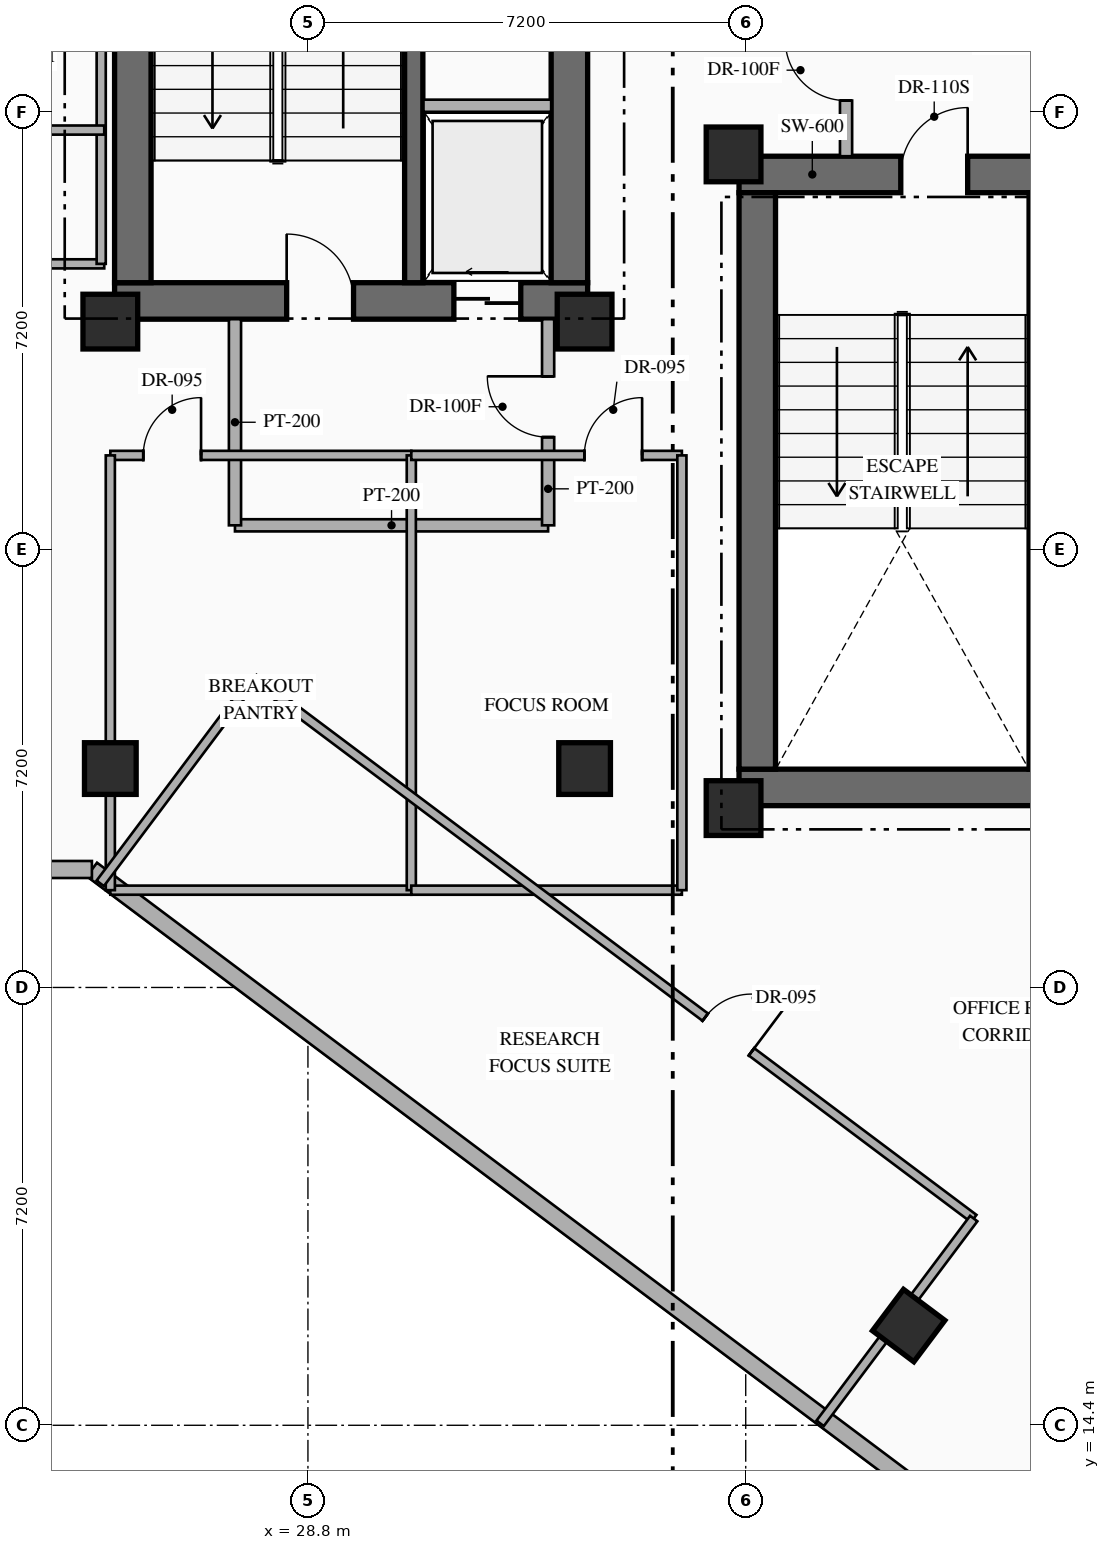
"""IFC4 building model, lengths in metres.
Left out: names, types, materials, properties, quantities, classifications, styles, units other than length and angle.
Written with IfcOpenShell. Run it as: python <this file> out.ifc"""

import sys

from ifc_helpers import new_model, si_unit, direction, frame, frame_2d, origin, origin_2d, place, context, subcontext, project, spatial, rectangle, hollow_rectangle, extrude, element, fill, save


model = new_model("IFC4")
c1 = context("Model", 3, precision=1e-05, world=origin(), true_north=direction((0.0, 1.0)))
c2 = subcontext(c1, "Body", "Model", "MODEL_VIEW")
j1 = project(units=[si_unit("LENGTHUNIT", "METRE"), si_unit("PLANEANGLEUNIT", "RADIAN")], contexts=[c1])
p1 = place(None, origin())
s1 = spatial("IfcSite", under=j1, at=p1, CompositionType="ELEMENT")
p2 = place(p1, origin())
s2 = spatial("IfcBuilding", under=s1, at=p2, CompositionType="ELEMENT")
p3 = place(p2, frame((0.0, 0.0, 145.65)))
s3 = spatial("IfcBuildingStorey", under=s2, at=p3, CompositionType="ELEMENT", Elevation=145.65)
p4 = place(p3, frame((25.62, 32.89, 0.0), z_axis=(0.0, 0.0, 1.0), x_axis=(1.0, 0.0, 0.0)))
e1 = element("IfcWall", 1, at=p4, inside=s3, PredefinedType="SHEAR", context=c2, shape_type="SweptSolid", body=[
    extrude(rectangle(XDim=7.78, YDim=0.6, at=frame_2d((3.89, 0.0))), origin(), (0.0, 0.0, 1.0), 3.6),
])
p5 = place(p4, frame((2.83, 0.0, 0.0)))
e2 = element("IfcOpeningElement", 2, at=p5, cuts=e1, PredefinedType="OPENING", context=c2, shape_type="SweptSolid", body=[
    extrude(rectangle(XDim=1.1, YDim=2.2, at=frame_2d((0.55, 1.1))), frame((0.0, 0.31, 0.0), z_axis=(0.0, -1.0, 0.0), x_axis=(1.0, 0.0, 0.0)), (0.0, 0.0, 1.0), 0.62),
])
p6 = place(p4, frame((5.58, 0.0, 0.0)))
e3 = element("IfcOpeningElement", 3, at=p6, cuts=e1, PredefinedType="OPENING", context=c2, shape_type="SweptSolid", body=[
    extrude(rectangle(XDim=1.1, YDim=2.15, at=frame_2d((0.55, 1.075))), frame((0.0, 0.31, 0.0), z_axis=(0.0, -1.0, 0.0), x_axis=(1.0, 0.0, 0.0)), (0.0, 0.0, 1.0), 0.62),
])
p7 = place(p3, frame((25.92, 33.19, 0.0), z_axis=(0.0, 0.0, 1.0), x_axis=(0.0, 1.0, 0.0)))
e4 = element("IfcWall", 4, at=p7, inside=s3, PredefinedType="SHEAR", context=c2, shape_type="SweptSolid", body=[
    extrude(rectangle(XDim=9.48, YDim=0.6, at=frame_2d((4.74, 0.0))), origin(), (0.0, 0.0, 1.0), 3.6),
])
p8 = place(p3, frame((33.1, 33.19, 0.0), z_axis=(0.0, 0.0, 1.0), x_axis=(0.0, 1.0, 0.0)))
e5 = element("IfcWall", 5, at=p8, inside=s3, PredefinedType="SHEAR", context=c2, shape_type="SweptSolid", body=[
    extrude(rectangle(XDim=9.48, YDim=0.6, at=frame_2d((4.74, 0.0))), origin(), (0.0, 0.0, 1.0), 3.6),
])
p9 = place(p8, frame((4.16, 0.0, 0.0)))
e6 = element("IfcOpeningElement", 6, at=p9, cuts=e5, PredefinedType="OPENING", context=c2, shape_type="SweptSolid", body=[
    extrude(rectangle(XDim=0.85, YDim=2.08, at=frame_2d((0.425, 1.04))), frame((0.0, 0.31, 0.0), z_axis=(0.0, -1.0, 0.0), x_axis=(1.0, 0.0, 0.0)), (0.0, 0.0, 1.0), 0.62),
])
p10 = place(p8, frame((7.36, 0.0, 0.0)))
e7 = element("IfcOpeningElement", 7, at=p10, cuts=e5, PredefinedType="OPENING", context=c2, shape_type="SweptSolid", body=[
    extrude(rectangle(XDim=0.85, YDim=2.08, at=frame_2d((0.425, 1.04))), frame((0.0, 0.31, 0.0), z_axis=(0.0, -1.0, 0.0), x_axis=(1.0, 0.0, 0.0)), (0.0, 0.0, 1.0), 0.62),
])
p11 = place(p3, frame((30.54, 33.19, 0.0), z_axis=(0.0, 0.0, 1.0), x_axis=(0.0, 1.0, 0.0)))
e8 = element("IfcWall", 8, at=p11, inside=s3, PredefinedType="SHEAR", context=c2, shape_type="SweptSolid", body=[
    extrude(rectangle(XDim=9.48, YDim=0.3, at=frame_2d((4.74, 0.0))), origin(), (0.0, 0.0, 1.0), 3.6),
])
p12 = place(p3, frame((35.89, 24.89, 0.0), z_axis=(0.0, 0.0, 1.0), x_axis=(1.0, 0.0, 0.0)))
e9 = element("IfcWall", 9, at=p12, inside=s3, PredefinedType="SHEAR", context=c2, shape_type="SweptSolid", body=[
    extrude(rectangle(XDim=7.76, YDim=0.6, at=frame_2d((3.88, 0.0))), origin(), (0.0, 0.0, 1.0), 3.6),
])
p13 = place(p3, frame((35.89, 34.97, 0.0), z_axis=(0.0, 0.0, 1.0), x_axis=(1.0, 0.0, 0.0)))
e10 = element("IfcWall", 10, at=p13, inside=s3, PredefinedType="SHEAR", context=c2, shape_type="SweptSolid", body=[
    extrude(rectangle(XDim=7.76, YDim=0.6, at=frame_2d((3.88, 0.0))), origin(), (0.0, 0.0, 1.0), 3.6),
])
p14 = place(p13, frame((2.66, 0.0, 0.0)))
e11 = element("IfcOpeningElement", 11, at=p14, cuts=e10, PredefinedType="OPENING", context=c2, shape_type="SweptSolid", body=[
    extrude(rectangle(XDim=1.1, YDim=2.2, at=frame_2d((0.55, 1.1))), frame((0.0, 0.31, 0.0), z_axis=(0.0, -1.0, 0.0), x_axis=(1.0, 0.0, 0.0)), (0.0, 0.0, 1.0), 0.62),
])
p15 = place(p13, frame((5.56, 0.0, 0.0)))
e12 = element("IfcOpeningElement", 12, at=p15, cuts=e10, PredefinedType="OPENING", context=c2, shape_type="SweptSolid", body=[
    extrude(rectangle(XDim=1.12, YDim=2.15, at=frame_2d((0.56, 1.075))), frame((0.0, 0.31, 0.0), z_axis=(0.0, -1.0, 0.0), x_axis=(1.0, 0.0, 0.0)), (0.0, 0.0, 1.0), 0.62),
])
p16 = place(p3, frame((36.19, 25.19, 0.0), z_axis=(0.0, 0.0, 1.0), x_axis=(0.0, 1.0, 0.0)))
e13 = element("IfcWall", 13, at=p16, inside=s3, PredefinedType="SHEAR", context=c2, shape_type="SweptSolid", body=[
    extrude(rectangle(XDim=9.48, YDim=0.6, at=frame_2d((4.74, 0.0))), origin(), (0.0, 0.0, 1.0), 3.6),
])
p17 = place(p3, frame((40.81, 25.19, 0.0), z_axis=(0.0, 0.0, 1.0), x_axis=(0.0, 1.0, 0.0)))
e14 = element("IfcWall", 14, at=p17, inside=s3, PredefinedType="SHEAR", context=c2, shape_type="SweptSolid", body=[
    extrude(rectangle(XDim=9.48, YDim=0.3, at=frame_2d((4.74, 0.0))), origin(), (0.0, 0.0, 1.0), 3.6),
])
for number, where, z_axis, x_axis in (
    (15, (25.55, 32.55, 0.0), (0.0, 0.0, 1.0), (1.0, 0.0, 0.0)),
    (16, (33.35, 32.55, 0.0), (0.0, 0.0, 1.0), (1.0, 0.0, 0.0)),
    (17, (35.8, 24.55, 0.0), (0.0, 0.0, 1.0), (1.0, 0.0, 0.0)),
    (18, (35.8, 35.3, 0.0), (0.0, 0.0, 1.0), (1.0, 0.0, 0.0)),
):
    element("IfcColumn", number, at=place(p3, frame(where, z_axis=z_axis, x_axis=x_axis)), inside=s3, PredefinedType="COLUMN", context=c2, shape_type="SweptSolid", body=[
        extrude(rectangle(XDim=0.9, YDim=0.9, at=origin_2d()), origin(), (0.0, 0.0, 1.0), 3.6),
    ])
for number, where, z_axis, x_axis in (
    (19, (25.55, 25.2, 0.0), (0.0, 0.0, 1.0), (1.0, 0.0, 0.0)),
    (20, (33.35, 25.2, 0.0), (0.0, 0.0, 1.0), (1.0, 0.0, 0.0)),
    (21, (38.68, 16.04, 0.0), (0.0, 0.0, 1.0), (0.8, -0.6, 0.0)),
):
    element("IfcColumn", number, at=place(p3, frame(where, z_axis=z_axis, x_axis=x_axis)), inside=s3, PredefinedType="COLUMN", context=c2, shape_type="SweptSolid", body=[
        extrude(hollow_rectangle(XDim=0.85, YDim=0.85, WallThickness=0.032, at=origin_2d()), origin(), (0.0, 0.0, 1.0), 3.6),
    ])
p18 = place(p3, frame((44.918, 8.787, 0.0), z_axis=(0.0, 0.0, 1.0), x_axis=(-0.800004765927, 0.599993645378, 0.0)))
e22 = element("IfcWall", 22, at=p18, inside=s3, PredefinedType="STANDARD", context=c2, shape_type="SweptSolid", body=[
    extrude(rectangle(XDim=24.588, YDim=0.28, at=frame_2d((12.294, 0.0))), origin(), (0.0, 0.0, 1.0), 3.35),
])
p19 = place(p3, frame((25.247, 23.54, 0.0), z_axis=(0.0, 0.0, 1.0), x_axis=(-1.0, 0.0, 0.0)))
e23 = element("IfcWall", 23, at=p19, inside=s3, PredefinedType="STANDARD", context=c2, shape_type="SweptSolid", body=[
    extrude(rectangle(XDim=6.747, YDim=0.28, at=frame_2d((3.374, 0.0))), origin(), (0.0, 0.0, 1.0), 3.35),
])
p20 = place(p3, frame((30.7, 36.1, 0.0), z_axis=(0.0, 0.0, 1.0), x_axis=(1.0, 0.0, 0.0)))
e24 = element("IfcWall", 24, at=p20, inside=s3, PredefinedType="STANDARD", context=c2, shape_type="SweptSolid", body=[
    extrude(rectangle(XDim=2.1, YDim=0.2, at=frame_2d((1.05, 0.0))), origin(), (0.0, 0.0, 1.0), 3.35),
])
p21 = place(p3, frame((27.6, 29.2, 0.0), z_axis=(0.0, 0.0, 1.0), x_axis=(1.0, 0.0, 0.0)))
e25 = element("IfcWall", 25, at=p21, inside=s3, PredefinedType="STANDARD", context=c2, shape_type="SweptSolid", body=[
    extrude(rectangle(XDim=5.15, YDim=0.2, at=frame_2d((2.575, 0.0))), origin(), (0.0, 0.0, 1.0), 3.35),
])
p22 = place(p3, frame((27.6, 29.2, 0.0), z_axis=(0.0, 0.0, 1.0), x_axis=(0.0, 1.0, 0.0)))
e26 = element("IfcWall", 26, at=p22, inside=s3, PredefinedType="STANDARD", context=c2, shape_type="SweptSolid", body=[
    extrude(rectangle(XDim=3.39, YDim=0.2, at=frame_2d((1.695, 0.0))), origin(), (0.0, 0.0, 1.0), 3.35),
])
p23 = place(p3, frame((32.75, 29.2, 0.0), z_axis=(0.0, 0.0, 1.0), x_axis=(0.0, 1.0, 0.0)))
e27 = element("IfcWall", 27, at=p23, inside=s3, PredefinedType="STANDARD", context=c2, shape_type="SweptSolid", body=[
    extrude(rectangle(XDim=3.39, YDim=0.2, at=frame_2d((1.695, 0.0))), origin(), (0.0, 0.0, 1.0), 3.35),
])
p24 = place(p23, frame((1.45, 0.0, 0.0)))
e28 = element("IfcOpeningElement", 28, at=p24, cuts=e27, PredefinedType="OPENING", context=c2, shape_type="SweptSolid", body=[
    extrude(rectangle(XDim=1.0, YDim=2.2, at=frame_2d((0.5, 1.1))), frame((0.0, 0.11, 0.0), z_axis=(0.0, -1.0, 0.0), x_axis=(1.0, 0.0, 0.0)), (0.0, 0.0, 1.0), 0.22),
])
p25 = place(p3, frame((37.65, 35.27, 0.0), z_axis=(0.0, 0.0, 1.0), x_axis=(0.0, 1.0, 0.0)))
e29 = element("IfcWall", 29, at=p25, inside=s3, PredefinedType="STANDARD", context=c2, shape_type="SweptSolid", body=[
    extrude(rectangle(XDim=2.83, YDim=0.2, at=frame_2d((1.415, 0.0))), origin(), (0.0, 0.0, 1.0), 3.35),
])
p26 = place(p25, frame((0.915, 0.0, 0.0)))
e30 = element("IfcOpeningElement", 30, at=p26, cuts=e29, PredefinedType="OPENING", context=c2, shape_type="SweptSolid", body=[
    extrude(rectangle(XDim=1.0, YDim=2.2, at=frame_2d((0.5, 1.1))), frame((0.0, 0.11, 0.0), z_axis=(0.0, -1.0, 0.0), x_axis=(1.0, 0.0, 0.0)), (0.0, 0.0, 1.0), 0.22),
])
p27 = place(p3, frame((22.15, 33.5, 0.0), z_axis=(0.0, 0.0, 1.0), x_axis=(1.0, 0.0, 0.0)))
e31 = element("IfcWall", 31, at=p27, inside=s3, PredefinedType="PARTITIONING", context=c2, shape_type="SweptSolid", body=[
    extrude(rectangle(XDim=3.3, YDim=0.15, at=frame_2d((1.65, 0.0))), origin(), (0.0, 0.0, 1.0), 3.35),
])
p28 = place(p3, frame((25.4, 33.5, 0.0), z_axis=(0.0, 0.0, 1.0), x_axis=(0.0, 1.0, 0.0)))
e32 = element("IfcWall", 32, at=p28, inside=s3, PredefinedType="PARTITIONING", context=c2, shape_type="SweptSolid", body=[
    extrude(rectangle(XDim=6.6, YDim=0.15, at=frame_2d((3.3, 0.0))), origin(), (0.0, 0.0, 1.0), 3.35),
])
p29 = place(p3, frame((22.15, 35.7, 0.0), z_axis=(0.0, 0.0, 1.0), x_axis=(1.0, 0.0, 0.0)))
e33 = element("IfcWall", 33, at=p29, inside=s3, PredefinedType="PARTITIONING", context=c2, shape_type="SweptSolid", body=[
    extrude(rectangle(XDim=3.3, YDim=0.15, at=frame_2d((1.65, 0.0))), origin(), (0.0, 0.0, 1.0), 3.35),
])
p30 = place(p3, frame((25.55, 23.2, 0.0), z_axis=(0.0, 0.0, 1.0), x_axis=(1.0, 0.0, 0.0)))
e34 = element("IfcWall", 34, at=p30, inside=s3, PredefinedType="PARTITIONING", context=c2, shape_type="SweptSolid", body=[
    extrude(rectangle(XDim=4.95, YDim=0.15, at=frame_2d((2.475, 0.0))), origin(), (0.0, 0.0, 1.0), 3.35),
])
p31 = place(p3, frame((25.55, 30.35, 0.0), z_axis=(0.0, 0.0, 1.0), x_axis=(1.0, 0.0, 0.0)))
e35 = element("IfcWall", 35, at=p31, inside=s3, PredefinedType="PARTITIONING", context=c2, shape_type="SweptSolid", body=[
    extrude(rectangle(XDim=4.95, YDim=0.15, at=frame_2d((2.475, 0.0))), origin(), (0.0, 0.0, 1.0), 3.35),
])
p32 = place(p31, frame((0.542, 0.0, 0.0)))
e36 = element("IfcOpeningElement", 36, at=p32, cuts=e35, PredefinedType="OPENING", context=c2, shape_type="SweptSolid", body=[
    extrude(rectangle(XDim=0.95, YDim=2.15, at=frame_2d((0.475, 1.075))), frame((0.0, 0.085, 0.0), z_axis=(0.0, -1.0, 0.0), x_axis=(1.0, 0.0, 0.0)), (0.0, 0.0, 1.0), 0.17),
])
p33 = place(p3, frame((25.55, 23.2, 0.0), z_axis=(0.0, 0.0, 1.0), x_axis=(0.0, 1.0, 0.0)))
e37 = element("IfcWall", 37, at=p33, inside=s3, PredefinedType="PARTITIONING", context=c2, shape_type="SweptSolid", body=[
    extrude(rectangle(XDim=7.15, YDim=0.15, at=frame_2d((3.575, 0.0))), origin(), (0.0, 0.0, 1.0), 2.695),
])
p34 = place(p3, frame((30.5, 23.2, 0.0), z_axis=(0.0, 0.0, 1.0), x_axis=(0.0, 1.0, 0.0)))
e38 = element("IfcWall", 38, at=p34, inside=s3, PredefinedType="PARTITIONING", context=c2, shape_type="SweptSolid", body=[
    extrude(rectangle(XDim=7.15, YDim=0.15, at=frame_2d((3.575, 0.0))), origin(), (0.0, 0.0, 1.0), 3.35),
])
p35 = place(p3, frame((30.5, 23.2, 0.0), z_axis=(0.0, 0.0, 1.0), x_axis=(1.0, 0.0, 0.0)))
e39 = element("IfcWall", 39, at=p35, inside=s3, PredefinedType="PARTITIONING", context=c2, shape_type="SweptSolid", body=[
    extrude(rectangle(XDim=4.45, YDim=0.15, at=frame_2d((2.225, 0.0))), origin(), (0.0, 0.0, 1.0), 3.35),
])
p36 = place(p3, frame((30.5, 30.35, 0.0), z_axis=(0.0, 0.0, 1.0), x_axis=(1.0, 0.0, 0.0)))
e40 = element("IfcWall", 40, at=p36, inside=s3, PredefinedType="PARTITIONING", context=c2, shape_type="SweptSolid", body=[
    extrude(rectangle(XDim=4.45, YDim=0.15, at=frame_2d((2.225, 0.0))), origin(), (0.0, 0.0, 1.0), 3.35),
])
p37 = place(p36, frame((2.846, 0.0, 0.0)))
e41 = element("IfcOpeningElement", 41, at=p37, cuts=e40, PredefinedType="OPENING", context=c2, shape_type="SweptSolid", body=[
    extrude(rectangle(XDim=0.95, YDim=2.15, at=frame_2d((0.475, 1.075))), frame((0.0, 0.085, 0.0), z_axis=(0.0, -1.0, 0.0), x_axis=(1.0, 0.0, 0.0)), (0.0, 0.0, 1.0), 0.17),
])
p38 = place(p3, frame((34.95, 23.2, 0.0), z_axis=(0.0, 0.0, 1.0), x_axis=(0.0, 1.0, 0.0)))
e42 = element("IfcWall", 42, at=p38, inside=s3, PredefinedType="PARTITIONING", context=c2, shape_type="SweptSolid", body=[
    extrude(rectangle(XDim=7.15, YDim=0.15, at=frame_2d((3.575, 0.0))), origin(), (0.0, 0.0, 1.0), 3.35),
])
p39 = place(p3, frame((27.91, 26.68, 0.0), z_axis=(0.0, 0.0, 1.0), x_axis=(0.800005938517, -0.599992081896, 0.0)))
e43 = element("IfcWall", 43, at=p39, inside=s3, PredefinedType="PARTITIONING", context=c2, shape_type="SweptSolid", body=[
    extrude(rectangle(XDim=14.8, YDim=0.15, at=frame_2d((7.4, 0.0))), origin(), (0.0, 0.0, 1.0), 3.35),
])
p40 = place(p39, frame((9.281, 0.0, 0.0)))
e44 = element("IfcOpeningElement", 44, at=p40, cuts=e43, PredefinedType="OPENING", context=c2, shape_type="SweptSolid", body=[
    extrude(rectangle(XDim=0.95, YDim=2.15, at=frame_2d((0.475, 1.075))), frame((0.0, 0.085, 0.0), z_axis=(0.0, -1.0, 0.0), x_axis=(1.0, 0.0, 0.0)), (0.0, 0.0, 1.0), 0.17),
])
p41 = place(p3, frame((25.384, 23.312, 0.0), z_axis=(0.0, 0.0, 1.0), x_axis=(0.599990721155, 0.80000695905, 0.0)))
e45 = element("IfcWall", 45, at=p41, inside=s3, PredefinedType="PARTITIONING", context=c2, shape_type="SweptSolid", body=[
    extrude(rectangle(XDim=4.21, YDim=0.15, at=frame_2d((2.105, 0.0))), origin(), (0.0, 0.0, 1.0), 3.35),
])
p42 = place(p3, frame((37.224, 14.432, 0.0), z_axis=(0.0, 0.0, 1.0), x_axis=(0.599962885857, 0.800027834262, 0.0)))
e46 = element("IfcWall", 46, at=p42, inside=s3, PredefinedType="PARTITIONING", context=c2, shape_type="SweptSolid", body=[
    extrude(rectangle(XDim=4.21, YDim=0.15, at=frame_2d((2.105, 0.0))), origin(), (0.0, 0.0, 1.0), 2.695),
])
p43 = place(p5, origin())
e47 = element("IfcDoor", 47, at=p43, inside=s3, OperationType="SINGLE_SWING_LEFT", PredefinedType="DOOR", context=c2, shape_type="SweptSolid", body=[
    extrude(rectangle(XDim=1.1, YDim=2.2, at=frame_2d((0.55, 1.1))), frame((0.0, 0.025, 0.0), z_axis=(0.0, -1.0, 0.0), x_axis=(1.0, 0.0, 0.0)), (0.0, 0.0, 1.0), 0.05),
])
fill(e2, e47)
p44 = place(p6, origin())
e48 = element("IfcDoor", 48, at=p44, inside=s3, OperationType="SLIDING_TO_LEFT", PredefinedType="USERDEFINED", context=c2, shape_type="SweptSolid", body=[
    extrude(rectangle(XDim=1.1, YDim=2.15, at=frame_2d((0.55, 1.075))), frame((0.0, 0.025, 0.0), z_axis=(0.0, -1.0, 0.0), x_axis=(1.0, 0.0, 0.0)), (0.0, 0.0, 1.0), 0.05),
])
fill(e3, e48)
p45 = place(p14, origin())
e49 = element("IfcDoor", 49, at=p45, inside=s3, OperationType="SINGLE_SWING_RIGHT", PredefinedType="DOOR", context=c2, shape_type="SweptSolid", body=[
    extrude(rectangle(XDim=1.1, YDim=2.2, at=frame_2d((0.55, 1.1))), frame((0.0, 0.025, 0.0), z_axis=(0.0, -1.0, 0.0), x_axis=(1.0, 0.0, 0.0)), (0.0, 0.0, 1.0), 0.05),
])
fill(e11, e49)
p46 = place(p24, origin())
e50 = element("IfcDoor", 50, at=p46, inside=s3, OperationType="SINGLE_SWING_RIGHT", PredefinedType="DOOR", context=c2, shape_type="SweptSolid", body=[
    extrude(rectangle(XDim=1.0, YDim=2.2, at=frame_2d((0.5, 1.1))), frame((0.0, 0.025, 0.0), z_axis=(0.0, -1.0, 0.0), x_axis=(1.0, 0.0, 0.0)), (0.0, 0.0, 1.0), 0.05),
])
fill(e28, e50)
p47 = place(p26, origin())
e51 = element("IfcDoor", 51, at=p47, inside=s3, OperationType="SINGLE_SWING_RIGHT", PredefinedType="DOOR", context=c2, shape_type="SweptSolid", body=[
    extrude(rectangle(XDim=1.0, YDim=2.2, at=frame_2d((0.5, 1.1))), frame((0.0, 0.025, 0.0), z_axis=(0.0, -1.0, 0.0), x_axis=(1.0, 0.0, 0.0)), (0.0, 0.0, 1.0), 0.05),
])
fill(e30, e51)
p48 = place(p32, origin())
e52 = element("IfcDoor", 52, at=p48, inside=s3, OperationType="SINGLE_SWING_RIGHT", PredefinedType="DOOR", context=c2, shape_type="SweptSolid", body=[
    extrude(rectangle(XDim=0.95, YDim=2.15, at=frame_2d((0.475, 1.075))), frame((0.0, 0.025, 0.0), z_axis=(0.0, -1.0, 0.0), x_axis=(1.0, 0.0, 0.0)), (0.0, 0.0, 1.0), 0.05),
])
fill(e36, e52)
p49 = place(p37, origin())
e53 = element("IfcDoor", 53, at=p49, inside=s3, OperationType="SINGLE_SWING_RIGHT", PredefinedType="DOOR", context=c2, shape_type="SweptSolid", body=[
    extrude(rectangle(XDim=0.95, YDim=2.15, at=frame_2d((0.475, 1.075))), frame((0.0, 0.025, 0.0), z_axis=(0.0, -1.0, 0.0), x_axis=(1.0, 0.0, 0.0)), (0.0, 0.0, 1.0), 0.05),
])
fill(e41, e53)
p50 = place(p40, origin())
e54 = element("IfcDoor", 54, at=p50, inside=s3, OperationType="SINGLE_SWING_RIGHT", PredefinedType="DOOR", context=c2, shape_type="SweptSolid", body=[
    extrude(rectangle(XDim=0.95, YDim=2.15, at=frame_2d((0.475, 1.075))), frame((0.0, 0.025, 0.0), z_axis=(0.0, -1.0, 0.0), x_axis=(1.0, 0.0, 0.0)), (0.0, 0.0, 1.0), 0.05),
])
fill(e44, e54)
save(model, sys.argv[1])
